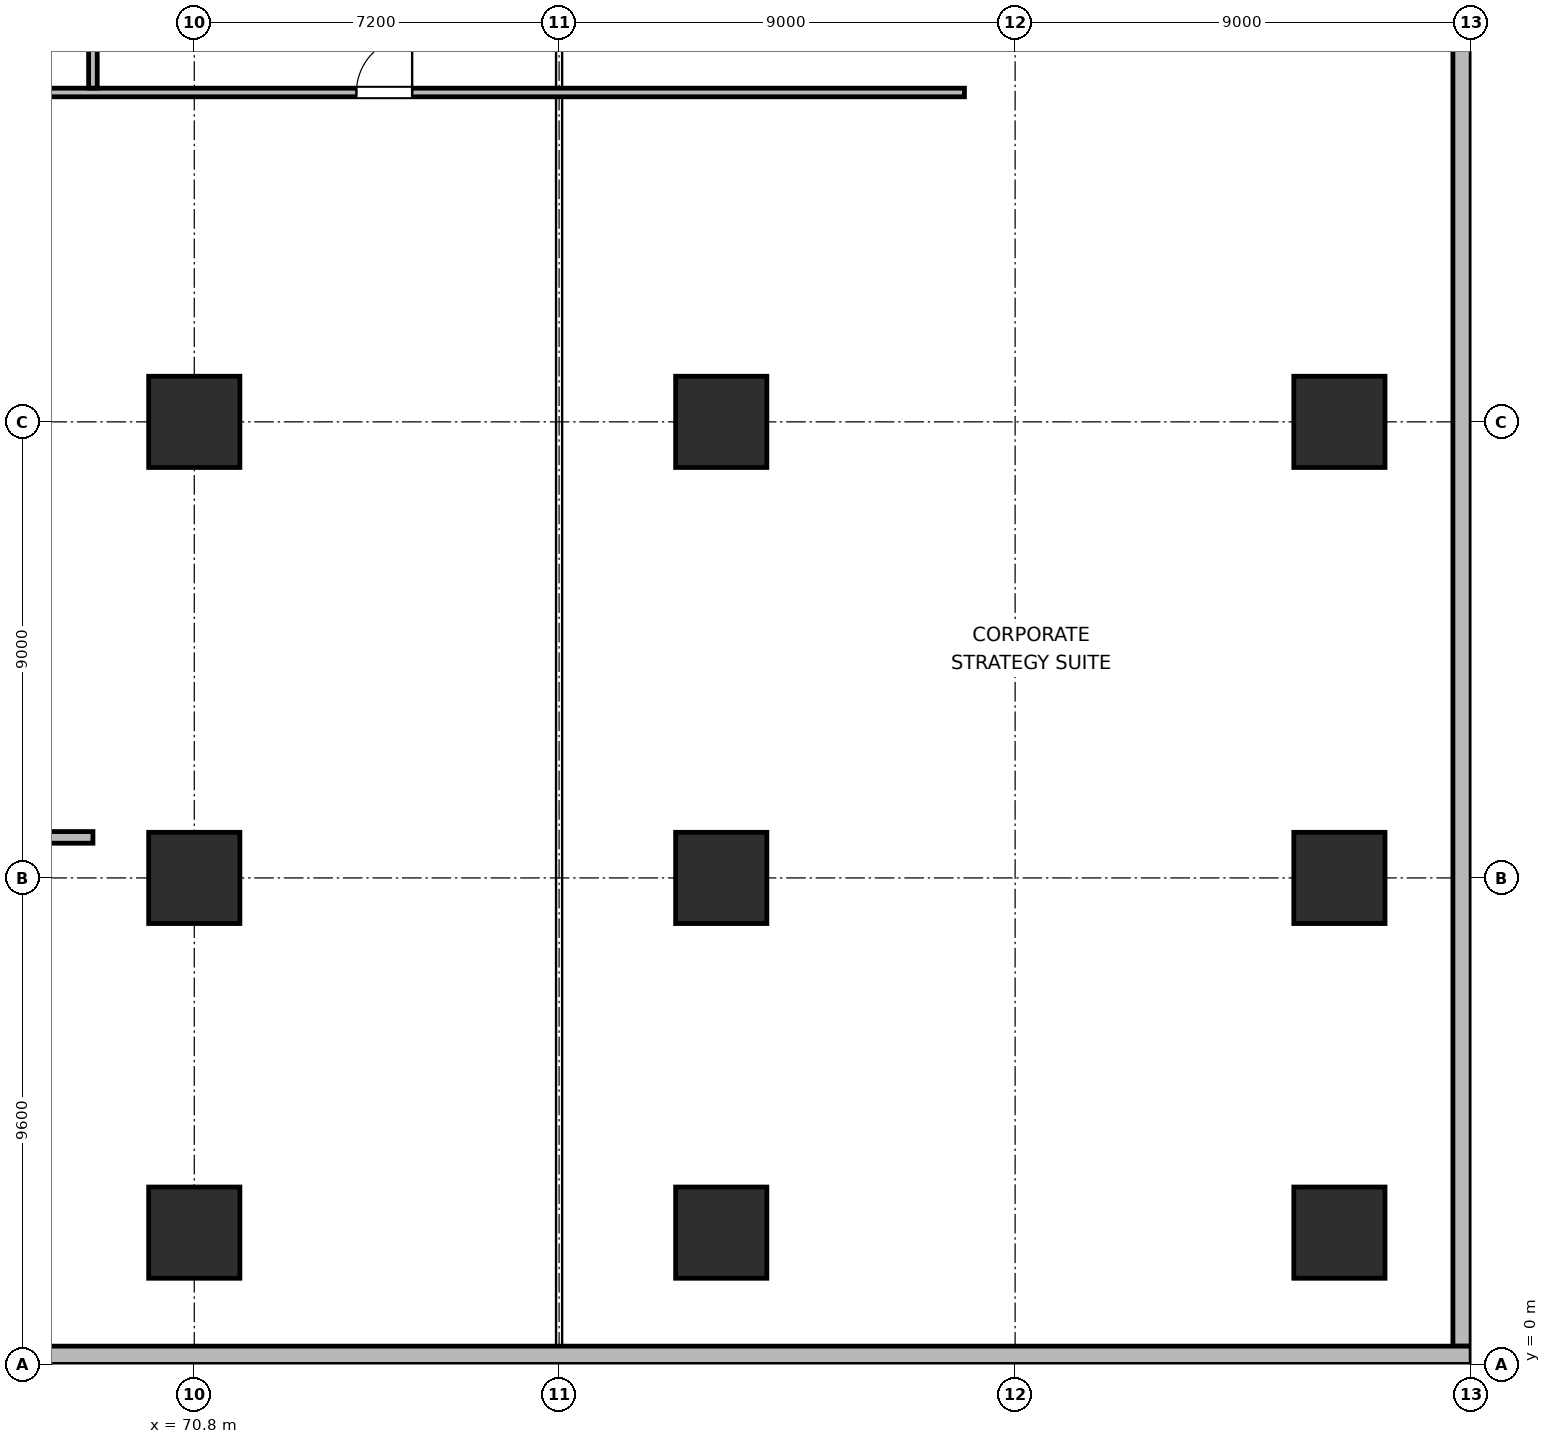
"""IFC4 building model, lengths in metres.
Left out: names, types, materials, properties, quantities, classifications, styles, units other than length and angle.
Written with IfcOpenShell. Run it as: python <this file> out.ifc"""

import sys

from ifc_helpers import new_model, si_unit, direction, frame, frame_2d, origin, origin_2d, place, context, subcontext, project, spatial, rectangle, extrude, element, fill, save


model = new_model("IFC4")
c1 = context("Model", 3, precision=1e-05, world=origin(), true_north=direction((0.0, 1.0)))
c2 = subcontext(c1, "Body", "Model", "MODEL_VIEW")
j1 = project(units=[si_unit("LENGTHUNIT", "METRE"), si_unit("PLANEANGLEUNIT", "RADIAN")], contexts=[c1])
p1 = place(None, origin())
s1 = spatial("IfcSite", under=j1, at=p1, CompositionType="ELEMENT")
p2 = place(p1, origin())
s2 = spatial("IfcBuilding", under=s1, at=p2, CompositionType="ELEMENT")
p3 = place(p2, frame((0.0, 0.0, 17.1)))
s3 = spatial("IfcBuildingStorey", under=s2, at=p3, CompositionType="ELEMENT", Elevation=17.1)
for number, where, z_axis, x_axis in (
    (1, (70.8, 2.6, 0.0), (0.0, 0.0, 1.0), (1.0, 0.0, 0.0)),
    (2, (70.8, 9.6, 0.0), (0.0, 0.0, 1.0), (1.0, 0.0, 0.0)),
    (3, (70.8, 18.6, 0.0), (0.0, 0.0, 1.0), (1.0, 0.0, 0.0)),
    (4, (81.2, 2.6, 0.0), (0.0, 0.0, 1.0), (1.0, 0.0, 0.0)),
    (5, (81.2, 9.6, 0.0), (0.0, 0.0, 1.0), (1.0, 0.0, 0.0)),
    (6, (81.2, 18.6, 0.0), (0.0, 0.0, 1.0), (1.0, 0.0, 0.0)),
    (7, (93.4, 2.6, 0.0), (0.0, 0.0, 1.0), (1.0, 0.0, 0.0)),
    (8, (93.4, 9.6, 0.0), (0.0, 0.0, 1.0), (1.0, 0.0, 0.0)),
    (9, (93.4, 18.6, 0.0), (0.0, 0.0, 1.0), (1.0, 0.0, 0.0)),
):
    element("IfcColumn", number, at=place(p3, frame(where, z_axis=z_axis, x_axis=x_axis)), inside=s3, PredefinedType="COLUMN", context=c2, shape_type="SweptSolid", body=[
        extrude(rectangle(XDim=1.8, YDim=1.8, at=origin_2d()), origin(), (0.0, 0.0, 1.0), 4.5),
    ])
p4 = place(p3, frame((95.82, 71.64, 0.0), z_axis=(0.0, 0.0, 1.0), x_axis=(0.0, -1.0, 0.0)))
e10 = element("IfcWall", 10, at=p4, inside=s3, PredefinedType="SOLIDWALL", context=c2, shape_type="SweptSolid", body=[
    extrude(rectangle(XDim=71.28, YDim=0.36, at=frame_2d((35.64, 0.0))), origin(), (0.0, 0.0, 1.0), 4.24),
])
p5 = place(p3, frame((96.0, 0.18, 0.0), z_axis=(0.0, 0.0, 1.0), x_axis=(-1.0, 0.0, 0.0)))
e11 = element("IfcWall", 11, at=p5, inside=s3, PredefinedType="SOLIDWALL", context=c2, shape_type="SweptSolid", body=[
    extrude(rectangle(XDim=39.72, YDim=0.36, at=frame_2d((19.86, 0.0))), origin(), (0.0, 0.0, 1.0), 4.24),
])
p6 = place(p3, frame((10.0, 25.1, 0.0), z_axis=(0.0, 0.0, 1.0), x_axis=(1.0, 0.0, 0.0)))
e12 = element("IfcWall", 12, at=p6, inside=s3, PredefinedType="PARTITIONING", context=c2, shape_type="SweptSolid", body=[
    extrude(rectangle(XDim=76.0, YDim=0.17, at=frame_2d((38.0, 0.0))), origin(), (0.0, 0.0, 1.0), 4.24),
])
p7 = place(p6, frame((2.2, 0.0, 0.0)))
e13 = element("IfcOpeningElement", 13, at=p7, cuts=e12, PredefinedType="OPENING", context=c2, shape_type="SweptSolid", body=[
    extrude(rectangle(XDim=1.8, YDim=2.06, at=frame_2d((0.9, 1.03))), frame((0.0, 0.095, 0.0), z_axis=(0.0, -1.0, 0.0), x_axis=(1.0, 0.0, 0.0)), (0.0, 0.0, 1.0), 0.19),
])
p8 = place(p6, frame((34.0, 0.0, 0.0)))
e14 = element("IfcOpeningElement", 14, at=p8, cuts=e12, PredefinedType="OPENING", context=c2, shape_type="SweptSolid", body=[
    extrude(rectangle(XDim=1.8, YDim=2.06, at=frame_2d((0.9, 1.03))), frame((0.0, 0.095, 0.0), z_axis=(0.0, -1.0, 0.0), x_axis=(1.0, 0.0, 0.0)), (0.0, 0.0, 1.0), 0.19),
])
p9 = place(p6, frame((64.0, 0.0, 0.0)))
e15 = element("IfcOpeningElement", 15, at=p9, cuts=e12, PredefinedType="OPENING", context=c2, shape_type="SweptSolid", body=[
    extrude(rectangle(XDim=1.1, YDim=2.05, at=frame_2d((0.55, 1.025))), frame((0.0, 0.095, 0.0), z_axis=(0.0, -1.0, 0.0), x_axis=(1.0, 0.0, 0.0)), (0.0, 0.0, 1.0), 0.19),
])
p10 = place(p3, frame((68.8, 25.187, 0.0), z_axis=(0.0, 0.0, 1.0), x_axis=(0.0, 1.0, 0.0)))
e16 = element("IfcWall", 16, at=p10, inside=s3, PredefinedType="PARTITIONING", context=c2, shape_type="SweptSolid", body=[
    extrude(rectangle(XDim=46.448, YDim=0.17, at=frame_2d((23.224, 0.0))), origin(), (0.0, 0.0, 1.0), 4.24),
])
p11 = place(p10, frame((15.913, 0.0, 0.0)))
e17 = element("IfcOpeningElement", 17, at=p11, cuts=e16, PredefinedType="OPENING", context=c2, shape_type="SweptSolid", body=[
    extrude(rectangle(XDim=1.1, YDim=2.05, at=frame_2d((0.55, 1.025))), frame((0.0, 0.095, 0.0), z_axis=(0.0, -1.0, 0.0), x_axis=(1.0, 0.0, 0.0)), (0.0, 0.0, 1.0), 0.19),
])
p12 = place(p3, frame((25.417, 10.4, 0.0), z_axis=(0.0, 0.0, 1.0), x_axis=(1.0, 0.0, 0.0)))
e18 = element("IfcWall", 18, at=p12, inside=s3, PredefinedType="PARTITIONING", context=c2, shape_type="SweptSolid", body=[
    extrude(rectangle(XDim=43.383, YDim=0.23, at=frame_2d((21.691, 0.0))), origin(), (0.0, 0.0, 1.0), 4.24),
])
p13 = place(p9, origin())
e19 = element("IfcDoor", 19, at=p13, inside=s3, OperationType="SINGLE_SWING_RIGHT", PredefinedType="DOOR", context=c2, shape_type="SweptSolid", body=[
    extrude(rectangle(XDim=1.1, YDim=2.05, at=frame_2d((0.55, 1.025))), frame((0.0, 0.025, 0.0), z_axis=(0.0, -1.0, 0.0), x_axis=(1.0, 0.0, 0.0)), (0.0, 0.0, 1.0), 0.05),
])
fill(e15, e19)
save(model, sys.argv[1])
